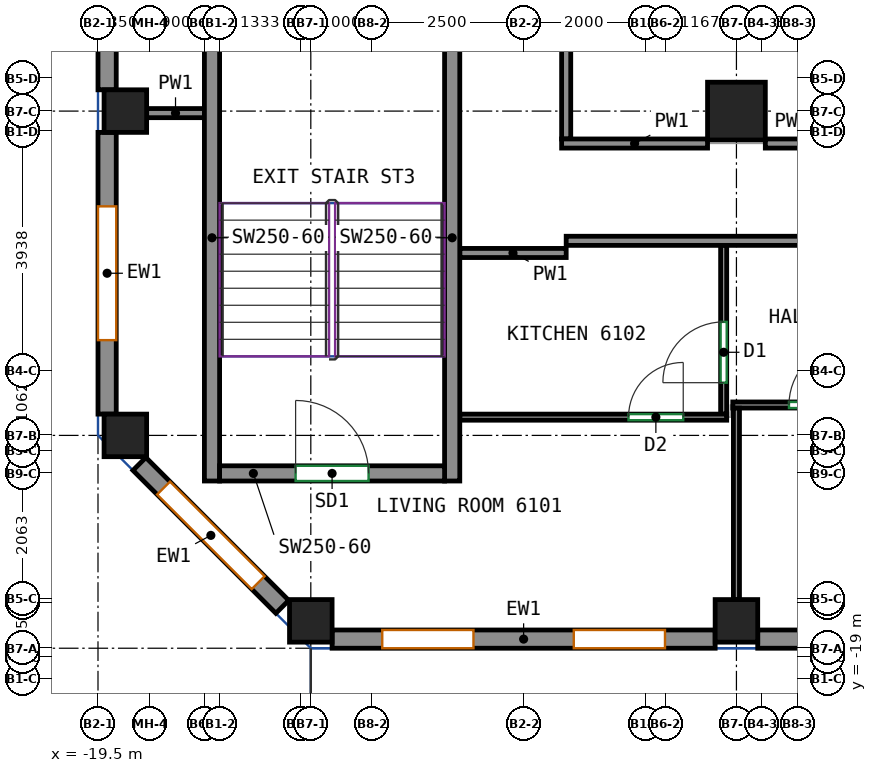
"""IFC4 building model, lengths in metres.
Left out: names, types, materials, properties, quantities, classifications, styles, units other than length and angle.
Written with IfcOpenShell. Run it as: python <this file> out.ifc"""

import sys

from ifc_helpers import new_model, si_unit, direction, frame, frame_2d, origin, origin_2d, place, context, subcontext, project, spatial, rectangle, extrude, source, transform, mapped, element, fill, save


model = new_model("IFC4")
c1 = context("Model", 3, precision=1e-05, world=origin(), true_north=direction((0.0, 1.0)))
c2 = subcontext(c1, "Body", "Model", "MODEL_VIEW")
j1 = project(units=[si_unit("LENGTHUNIT", "METRE"), si_unit("PLANEANGLEUNIT", "RADIAN")], contexts=[c1])
p1 = place(None, origin())
s1 = spatial("IfcSite", under=j1, at=p1, CompositionType="ELEMENT")
p2 = place(p1, origin())
s2 = spatial("IfcBuilding", under=s1, at=p2, CompositionType="ELEMENT")
p3 = place(p2, frame((0.0, 0.0, 252.6)))
s3 = spatial("IfcBuildingStorey", under=s2, at=p3, CompositionType="ELEMENT", Elevation=252.6)
m1 = source(origin(), c2, "Body", "SweptSolid", [
    extrude(rectangle(XDim=0.7, YDim=0.7, at=origin_2d()), origin(), (0.0, 0.0, 1.0), 3.12),
])
for number, where, z_axis, x_axis in (
    (1, (-19.05, -15.0, 0.0), (0.0, 0.0, 1.0), (1.0, 0.0, 0.0)),
    (2, (-19.05, -9.667, 0.0), (0.0, 0.0, 1.0), (1.0, 0.0, 0.0)),
    (3, (-16.0, -18.05, 0.0), (0.0, 0.0, 1.0), (1.0, 0.0, 0.0)),
    (4, (-9.0, -18.05, 0.0), (0.0, 0.0, 1.0), (1.0, 0.0, 0.0)),
):
    element("IfcColumn", number, at=place(p3, frame(where, z_axis=z_axis, x_axis=x_axis)), inside=s3, PredefinedType="COLUMN", context=c2, shape_type="MappedRepresentation", body=[
        mapped(m1, transform((0.0, 0.0, 0.0))),
    ])
m2 = source(origin(), c2, "Body", "SweptSolid", [
    extrude(rectangle(XDim=0.95, YDim=0.95, at=origin_2d()), origin(), (0.0, 0.0, 1.0), 3.12),
])
p4 = place(p3, frame((-9.0, -9.667, 0.0), z_axis=(0.0, 0.0, 1.0), x_axis=(1.0, 0.0, 0.0)))
e5 = element("IfcColumn", 5, at=p4, inside=s3, PredefinedType="COLUMN", context=c2, shape_type="MappedRepresentation", body=[
    mapped(m2, transform((0.0, 0.0, 0.0))),
])
m3 = source(origin(), c2, "Body", "SweptSolid", [
    extrude(rectangle(XDim=8.0, YDim=0.25, at=frame_2d((4.0, 0.0))), origin(), (0.0, 0.0, 1.0), 3.12),
])
for number, where, z_axis, x_axis in (
    (6, (-17.625, -15.75, 0.0), (0.0, 0.0, 1.0), (0.0, 1.0, 0.0)),
    (7, (-13.675, -15.75, 0.0), (0.0, 0.0, 1.0), (0.0, 1.0, 0.0)),
):
    element("IfcWall", number, at=place(p3, frame(where, z_axis=z_axis, x_axis=x_axis)), inside=s3, PredefinedType="SHEAR", context=c2, shape_type="MappedRepresentation", body=[
        mapped(m3, transform((0.0, 0.0, 0.0))),
    ])
m4 = source(origin(), c2, "Body", "SweptSolid", [
    extrude(rectangle(XDim=3.7, YDim=0.25, at=frame_2d((1.85, 0.0))), origin(), (0.0, 0.0, 1.0), 3.12),
])
p5 = place(p3, frame((-17.5, -15.625, 0.0), z_axis=(0.0, 0.0, 1.0), x_axis=(1.0, 0.0, 0.0)))
e8 = element("IfcWall", 8, at=p5, inside=s3, PredefinedType="SHEAR", context=c2, shape_type="MappedRepresentation", body=[
    mapped(m4, transform((0.0, 0.0, 0.0))),
])
p6 = place(p5, frame((1.25, 0.0, 0.0)))
e9 = element("IfcOpeningElement", 9, at=p6, cuts=e8, PredefinedType="OPENING", context=c2, shape_type="SweptSolid", body=[
    extrude(rectangle(XDim=1.2, YDim=2.1, at=frame_2d((0.6, 1.05))), frame((0.0, 0.135, 0.0), z_axis=(0.0, -1.0, 0.0), x_axis=(1.0, 0.0, 0.0)), (0.0, 0.0, 1.0), 0.27),
])
m5 = source(origin(), c2, "Body", "SweptSolid", [
    extrude(rectangle(XDim=6.3, YDim=0.3, at=frame_2d((3.15, 0.0))), origin(), (0.0, 0.0, 1.0), 3.12),
])
p7 = place(p3, frame((-15.65, -18.35, 0.0), z_axis=(0.0, 0.0, 1.0), x_axis=(1.0, 0.0, 0.0)))
e10 = element("IfcWall", 10, at=p7, inside=s3, PredefinedType="SOLIDWALL", context=c2, shape_type="MappedRepresentation", body=[
    mapped(m5, transform((0.0, 0.0, 0.0))),
])
p8 = place(p7, frame((0.825, 0.0, 0.8)))
e11 = element("IfcOpeningElement", 11, at=p8, cuts=e10, PredefinedType="OPENING", context=c2, shape_type="SweptSolid", body=[
    extrude(rectangle(XDim=1.5, YDim=2.05, at=frame_2d((0.75, 1.025))), frame((0.0, 0.16, 0.0), z_axis=(0.0, -1.0, 0.0), x_axis=(1.0, 0.0, 0.0)), (0.0, 0.0, 1.0), 0.32),
])
p9 = place(p7, frame((3.975, 0.0, 0.8)))
e12 = element("IfcOpeningElement", 12, at=p9, cuts=e10, PredefinedType="OPENING", context=c2, shape_type="SweptSolid", body=[
    extrude(rectangle(XDim=1.5, YDim=2.05, at=frame_2d((0.75, 1.025))), frame((0.0, 0.16, 0.0), z_axis=(0.0, -1.0, 0.0), x_axis=(1.0, 0.0, 0.0)), (0.0, 0.0, 1.0), 0.32),
])
p10 = place(p3, frame((-8.65, -18.35, 0.0), z_axis=(0.0, 0.0, 1.0), x_axis=(1.0, 0.0, 0.0)))
e13 = element("IfcWall", 13, at=p10, inside=s3, PredefinedType="SOLIDWALL", context=c2, shape_type="MappedRepresentation", body=[
    mapped(m5, transform((0.0, 0.0, 0.0))),
])
p11 = place(p10, frame((0.825, 0.0, 0.8)))
e14 = element("IfcOpeningElement", 14, at=p11, cuts=e13, PredefinedType="OPENING", context=c2, shape_type="SweptSolid", body=[
    extrude(rectangle(XDim=1.5, YDim=2.05, at=frame_2d((0.75, 1.025))), frame((0.0, 0.16, 0.0), z_axis=(0.0, -1.0, 0.0), x_axis=(1.0, 0.0, 0.0)), (0.0, 0.0, 1.0), 0.32),
])
p12 = place(p10, frame((3.975, 0.0, 0.8)))
e15 = element("IfcOpeningElement", 15, at=p12, cuts=e13, PredefinedType="OPENING", context=c2, shape_type="SweptSolid", body=[
    extrude(rectangle(XDim=1.5, YDim=2.05, at=frame_2d((0.75, 1.025))), frame((0.0, 0.16, 0.0), z_axis=(0.0, -1.0, 0.0), x_axis=(1.0, 0.0, 0.0)), (0.0, 0.0, 1.0), 0.32),
])
m6 = source(origin(), c2, "Body", "SweptSolid", [
    extrude(rectangle(XDim=8.133, YDim=0.3, at=frame_2d((4.067, 0.0))), origin(), (0.0, 0.0, 1.0), 3.12),
])
p13 = place(p3, frame((-19.35, -1.183, 0.0), z_axis=(0.0, 0.0, 1.0), x_axis=(0.0, -1.0, 0.0)))
e16 = element("IfcWall", 16, at=p13, inside=s3, PredefinedType="SOLIDWALL", context=c2, shape_type="MappedRepresentation", body=[
    mapped(m6, transform((0.0, 0.0, 0.0))),
])
p14 = place(p13, frame((0.933, 0.0, 0.8)))
e17 = element("IfcOpeningElement", 17, at=p14, cuts=e16, PredefinedType="OPENING", context=c2, shape_type="SweptSolid", body=[
    extrude(rectangle(XDim=2.2, YDim=2.05, at=frame_2d((1.1, 1.025))), frame((0.0, 0.16, 0.0), z_axis=(0.0, -1.0, 0.0), x_axis=(1.0, 0.0, 0.0)), (0.0, 0.0, 1.0), 0.32),
])
p15 = place(p13, frame((5.0, 0.0, 0.8)))
e18 = element("IfcOpeningElement", 18, at=p15, cuts=e16, PredefinedType="OPENING", context=c2, shape_type="SweptSolid", body=[
    extrude(rectangle(XDim=2.2, YDim=2.05, at=frame_2d((1.1, 1.025))), frame((0.0, 0.16, 0.0), z_axis=(0.0, -1.0, 0.0), x_axis=(1.0, 0.0, 0.0)), (0.0, 0.0, 1.0), 0.32),
])
m7 = source(origin(), c2, "Body", "SweptSolid", [
    extrude(rectangle(XDim=4.633, YDim=0.3, at=frame_2d((2.317, 0.0))), origin(), (0.0, 0.0, 1.0), 3.12),
])
p16 = place(p3, frame((-19.35, -10.017, 0.0), z_axis=(0.0, 0.0, 1.0), x_axis=(0.0, -1.0, 0.0)))
e19 = element("IfcWall", 19, at=p16, inside=s3, PredefinedType="SOLIDWALL", context=c2, shape_type="MappedRepresentation", body=[
    mapped(m7, transform((0.0, 0.0, 0.0))),
])
p17 = place(p16, frame((1.217, 0.0, 0.8)))
e20 = element("IfcOpeningElement", 20, at=p17, cuts=e19, PredefinedType="OPENING", context=c2, shape_type="SweptSolid", body=[
    extrude(rectangle(XDim=2.2, YDim=2.05, at=frame_2d((1.1, 1.025))), frame((0.0, 0.16, 0.0), z_axis=(0.0, -1.0, 0.0), x_axis=(1.0, 0.0, 0.0)), (0.0, 0.0, 1.0), 0.32),
])
m8 = source(origin(), c2, "Body", "SweptSolid", [
    extrude(rectangle(XDim=3.323, YDim=0.3, at=frame_2d((1.662, 0.0))), origin(), (0.0, 0.0, 1.0), 3.12),
])
p18 = place(p3, frame((-18.819, -15.469, 0.0), z_axis=(0.0, 0.0, 1.0), x_axis=(0.707070049321, -0.707143511144, 0.0)))
e21 = element("IfcWall", 21, at=p18, inside=s3, PredefinedType="SOLIDWALL", context=c2, shape_type="MappedRepresentation", body=[
    mapped(m8, transform((0.0, 0.0, 0.0))),
])
p19 = place(p18, frame((0.562, 0.0, 0.8)))
e22 = element("IfcOpeningElement", 22, at=p19, cuts=e21, PredefinedType="OPENING", context=c2, shape_type="SweptSolid", body=[
    extrude(rectangle(XDim=2.2, YDim=2.05, at=frame_2d((1.1, 1.025))), frame((0.0, 0.16, 0.0), z_axis=(0.0, -1.0, 0.0), x_axis=(1.0, 0.0, 0.0)), (0.0, 0.0, 1.0), 0.32),
])
p20 = place(p3, frame((-11.8, -11.8, 0.0), z_axis=(0.0, 0.0, 1.0), x_axis=(1.0, 0.0, 0.0)))
e23 = element("IfcWall", 23, at=p20, inside=s3, PredefinedType="PARTITIONING", context=c2, shape_type="SweptSolid", body=[
    extrude(rectangle(XDim=27.31, YDim=0.15, at=frame_2d((13.655, 0.0))), origin(), (0.0, 0.0, 1.0), 3.12),
])
p21 = place(p20, frame((5.021, 0.0, 0.0)))
e24 = element("IfcOpeningElement", 24, at=p21, cuts=e23, PredefinedType="OPENING", context=c2, shape_type="SweptSolid", body=[
    extrude(rectangle(XDim=1.0, YDim=2.1, at=frame_2d((0.5, 1.05))), frame((0.0, 0.085, 0.0), z_axis=(0.0, -1.0, 0.0), x_axis=(1.0, 0.0, 0.0)), (0.0, 0.0, 1.0), 0.17),
])
p22 = place(p20, frame((18.457, 0.0, 0.0)))
e25 = element("IfcOpeningElement", 25, at=p22, cuts=e23, PredefinedType="OPENING", context=c2, shape_type="SweptSolid", body=[
    extrude(rectangle(XDim=1.0, YDim=2.1, at=frame_2d((0.5, 1.05))), frame((0.0, 0.085, 0.0), z_axis=(0.0, -1.0, 0.0), x_axis=(1.0, 0.0, 0.0)), (0.0, 0.0, 1.0), 0.17),
])
p23 = place(p3, frame((-13.55, -12.0, 0.0), z_axis=(0.0, 0.0, 1.0), x_axis=(1.0, 0.0, 0.0)))
e26 = element("IfcWall", 26, at=p23, inside=s3, PredefinedType="PARTITIONING", context=c2, shape_type="SweptSolid", body=[
    extrude(rectangle(XDim=1.75, YDim=0.15, at=frame_2d((0.875, 0.0))), origin(), (0.0, 0.0, 1.0), 3.12),
])
p24 = place(p3, frame((-18.7, -9.7, 0.0), z_axis=(0.0, 0.0, 1.0), x_axis=(1.0, 0.0, 0.0)))
e27 = element("IfcWall", 27, at=p24, inside=s3, PredefinedType="PARTITIONING", context=c2, shape_type="SweptSolid", body=[
    extrude(rectangle(XDim=0.95, YDim=0.15, at=frame_2d((0.475, 0.0))), origin(), (0.0, 0.0, 1.0), 3.12),
])
p25 = place(p3, frame((-11.8, -10.125, 0.0), z_axis=(0.0, 0.0, 1.0), x_axis=(0.0, 1.0, 0.0)))
e28 = element("IfcWall", 28, at=p25, inside=s3, PredefinedType="PARTITIONING", context=c2, shape_type="SweptSolid", body=[
    extrude(rectangle(XDim=4.785, YDim=0.15, at=frame_2d((2.393, 0.0))), origin(), (0.0, 0.0, 1.0), 3.12),
])
p26 = place(p25, frame((3.07, 0.0, 0.0)))
e29 = element("IfcOpeningElement", 29, at=p26, cuts=e28, PredefinedType="OPENING", context=c2, shape_type="SweptSolid", body=[
    extrude(rectangle(XDim=0.9, YDim=2.1, at=frame_2d((0.45, 1.05))), frame((0.0, 0.085, 0.0), z_axis=(0.0, -1.0, 0.0), x_axis=(1.0, 0.0, 0.0)), (0.0, 0.0, 1.0), 0.17),
])
p27 = place(p3, frame((-8.525, -10.2, 0.0), z_axis=(0.0, 0.0, 1.0), x_axis=(1.0, 0.0, 0.0)))
e30 = element("IfcWall", 30, at=p27, inside=s3, PredefinedType="PARTITIONING", context=c2, shape_type="SweptSolid", body=[
    extrude(rectangle(XDim=2.1, YDim=0.15, at=frame_2d((1.05, 0.0))), origin(), (0.0, 0.0, 1.0), 3.12),
])
p28 = place(p3, frame((-11.875, -10.2, 0.0), z_axis=(0.0, 0.0, 1.0), x_axis=(1.0, 0.0, 0.0)))
e31 = element("IfcWall", 31, at=p28, inside=s3, PredefinedType="PARTITIONING", context=c2, shape_type="SweptSolid", body=[
    extrude(rectangle(XDim=2.4, YDim=0.15, at=frame_2d((1.2, 0.0))), origin(), (0.0, 0.0, 1.0), 3.12),
])
p29 = place(p3, frame((-9.21, -14.65, 0.0), z_axis=(0.0, 0.0, 1.0), x_axis=(0.0, 1.0, 0.0)))
e32 = element("IfcWall", 32, at=p29, inside=s3, PredefinedType="PARTITIONING", context=c2, shape_type="SweptSolid", body=[
    extrude(rectangle(XDim=2.773, YDim=0.1, at=frame_2d((1.386, 0.0))), origin(), (0.0, 0.0, 1.0), 3.12),
])
p30 = place(p29, frame((0.517, 0.0, 0.0)))
e33 = element("IfcOpeningElement", 33, at=p30, cuts=e32, PredefinedType="OPENING", context=c2, shape_type="SweptSolid", body=[
    extrude(rectangle(XDim=1.0, YDim=2.1, at=frame_2d((0.5, 1.05))), frame((0.0, 0.06, 0.0), z_axis=(0.0, -1.0, 0.0), x_axis=(1.0, 0.0, 0.0)), (0.0, 0.0, 1.0), 0.12),
])
p31 = place(p3, frame((-13.55, -14.7, 0.0), z_axis=(0.0, 0.0, 1.0), x_axis=(1.0, 0.0, 0.0)))
e34 = element("IfcWall", 34, at=p31, inside=s3, PredefinedType="PARTITIONING", context=c2, shape_type="SweptSolid", body=[
    extrude(rectangle(XDim=4.39, YDim=0.1, at=frame_2d((2.195, 0.0))), origin(), (0.0, 0.0, 1.0), 3.12),
])
p32 = place(p31, frame((2.775, 0.0, 0.0)))
e35 = element("IfcOpeningElement", 35, at=p32, cuts=e34, PredefinedType="OPENING", context=c2, shape_type="SweptSolid", body=[
    extrude(rectangle(XDim=0.9, YDim=2.1, at=frame_2d((0.45, 1.05))), frame((0.0, 0.06, 0.0), z_axis=(0.0, -1.0, 0.0), x_axis=(1.0, 0.0, 0.0)), (0.0, 0.0, 1.0), 0.12),
])
p33 = place(p3, frame((-9.06, -14.5, 0.0), z_axis=(0.0, 0.0, 1.0), x_axis=(1.0, 0.0, 0.0)))
e36 = element("IfcWall", 36, at=p33, inside=s3, PredefinedType="PARTITIONING", context=c2, shape_type="SweptSolid", body=[
    extrude(rectangle(XDim=24.66, YDim=0.1, at=frame_2d((12.33, 0.0))), origin(), (0.0, 0.0, 1.0), 3.12),
])
p34 = place(p33, frame((0.924, 0.0, 0.0)))
e37 = element("IfcOpeningElement", 37, at=p34, cuts=e36, PredefinedType="OPENING", context=c2, shape_type="SweptSolid", body=[
    extrude(rectangle(XDim=1.0, YDim=2.1, at=frame_2d((0.5, 1.05))), frame((0.0, 0.06, 0.0), z_axis=(0.0, -1.0, 0.0), x_axis=(1.0, 0.0, 0.0)), (0.0, 0.0, 1.0), 0.12),
])
p35 = place(p33, frame((15.945, 0.0, 0.0)))
e38 = element("IfcOpeningElement", 38, at=p35, cuts=e36, PredefinedType="OPENING", context=c2, shape_type="SweptSolid", body=[
    extrude(rectangle(XDim=1.0, YDim=2.1, at=frame_2d((0.5, 1.05))), frame((0.0, 0.06, 0.0), z_axis=(0.0, -1.0, 0.0), x_axis=(1.0, 0.0, 0.0)), (0.0, 0.0, 1.0), 0.12),
])
p36 = place(p33, frame((18.387, 0.0, 0.0)))
e39 = element("IfcOpeningElement", 39, at=p36, cuts=e36, PredefinedType="OPENING", context=c2, shape_type="SweptSolid", body=[
    extrude(rectangle(XDim=1.0, YDim=2.1, at=frame_2d((0.5, 1.05))), frame((0.0, 0.06, 0.0), z_axis=(0.0, -1.0, 0.0), x_axis=(1.0, 0.0, 0.0)), (0.0, 0.0, 1.0), 0.12),
])
p37 = place(p3, frame((-9.0, -17.7, 0.0), z_axis=(0.0, 0.0, 1.0), x_axis=(0.0, 1.0, 0.0)))
e40 = element("IfcWall", 40, at=p37, inside=s3, PredefinedType="PARTITIONING", context=c2, shape_type="SweptSolid", body=[
    extrude(rectangle(XDim=3.148, YDim=0.1, at=frame_2d((1.574, 0.0))), origin(), (0.0, 0.0, 1.0), 3.12),
])
p38 = place(p8, origin())
e41 = element("IfcWindow", 41, at=p38, inside=s3, PartitioningType="SINGLE_PANEL", PredefinedType="WINDOW", context=c2, shape_type="SweptSolid", body=[
    extrude(rectangle(XDim=1.5, YDim=2.05, at=frame_2d((0.75, 1.025))), frame((0.0, 0.03, 0.0), z_axis=(0.0, -1.0, 0.0), x_axis=(1.0, 0.0, 0.0)), (0.0, 0.0, 1.0), 0.06),
])
fill(e11, e41)
p39 = place(p9, origin())
e42 = element("IfcWindow", 42, at=p39, inside=s3, PartitioningType="SINGLE_PANEL", PredefinedType="WINDOW", context=c2, shape_type="SweptSolid", body=[
    extrude(rectangle(XDim=1.5, YDim=2.05, at=frame_2d((0.75, 1.025))), frame((0.0, 0.03, 0.0), z_axis=(0.0, -1.0, 0.0), x_axis=(1.0, 0.0, 0.0)), (0.0, 0.0, 1.0), 0.06),
])
fill(e12, e42)
p40 = place(p17, origin())
e43 = element("IfcWindow", 43, at=p40, inside=s3, PartitioningType="SINGLE_PANEL", PredefinedType="WINDOW", context=c2, shape_type="SweptSolid", body=[
    extrude(rectangle(XDim=2.2, YDim=2.05, at=frame_2d((1.1, 1.025))), frame((0.0, 0.03, 0.0), z_axis=(0.0, -1.0, 0.0), x_axis=(1.0, 0.0, 0.0)), (0.0, 0.0, 1.0), 0.06),
])
fill(e20, e43)
p41 = place(p19, origin())
e44 = element("IfcWindow", 44, at=p41, inside=s3, PartitioningType="SINGLE_PANEL", PredefinedType="WINDOW", context=c2, shape_type="SweptSolid", body=[
    extrude(rectangle(XDim=2.2, YDim=2.05, at=frame_2d((1.1, 1.025))), frame((0.0, 0.03, 0.0), z_axis=(0.0, -1.0, 0.0), x_axis=(1.0, 0.0, 0.0)), (0.0, 0.0, 1.0), 0.06),
])
fill(e22, e44)
p42 = place(p6, origin())
e45 = element("IfcDoor", 45, at=p42, inside=s3, OperationType="DOUBLE_DOOR_SINGLE_SWING", PredefinedType="DOOR", context=c2, shape_type="SweptSolid", body=[
    extrude(rectangle(XDim=1.2, YDim=2.1, at=frame_2d((0.6, 1.05))), frame((0.0, 0.025, 0.0), z_axis=(0.0, -1.0, 0.0), x_axis=(1.0, 0.0, 0.0)), (0.0, 0.0, 1.0), 0.05),
])
fill(e9, e45)
p43 = place(p32, origin())
e46 = element("IfcDoor", 46, at=p43, inside=s3, OperationType="SINGLE_SWING_RIGHT", PredefinedType="DOOR", context=c2, shape_type="SweptSolid", body=[
    extrude(rectangle(XDim=0.9, YDim=2.1, at=frame_2d((0.45, 1.05))), frame((0.0, 0.025, 0.0), z_axis=(0.0, -1.0, 0.0), x_axis=(1.0, 0.0, 0.0)), (0.0, 0.0, 1.0), 0.05),
])
fill(e35, e46)
p44 = place(p34, origin())
e47 = element("IfcDoor", 47, at=p44, inside=s3, OperationType="SINGLE_SWING_RIGHT", PredefinedType="DOOR", context=c2, shape_type="SweptSolid", body=[
    extrude(rectangle(XDim=1.0, YDim=2.1, at=frame_2d((0.5, 1.05))), frame((0.0, 0.025, 0.0), z_axis=(0.0, -1.0, 0.0), x_axis=(1.0, 0.0, 0.0)), (0.0, 0.0, 1.0), 0.05),
])
fill(e37, e47)
p45 = place(p30, origin())
e48 = element("IfcDoor", 48, at=p45, inside=s3, OperationType="SINGLE_SWING_LEFT", PredefinedType="DOOR", context=c2, shape_type="SweptSolid", body=[
    extrude(rectangle(XDim=1.0, YDim=2.1, at=frame_2d((0.5, 1.05))), frame((0.0, 0.025, 0.0), z_axis=(0.0, -1.0, 0.0), x_axis=(1.0, 0.0, 0.0)), (0.0, 0.0, 1.0), 0.05),
])
fill(e33, e48)
save(model, sys.argv[1])
